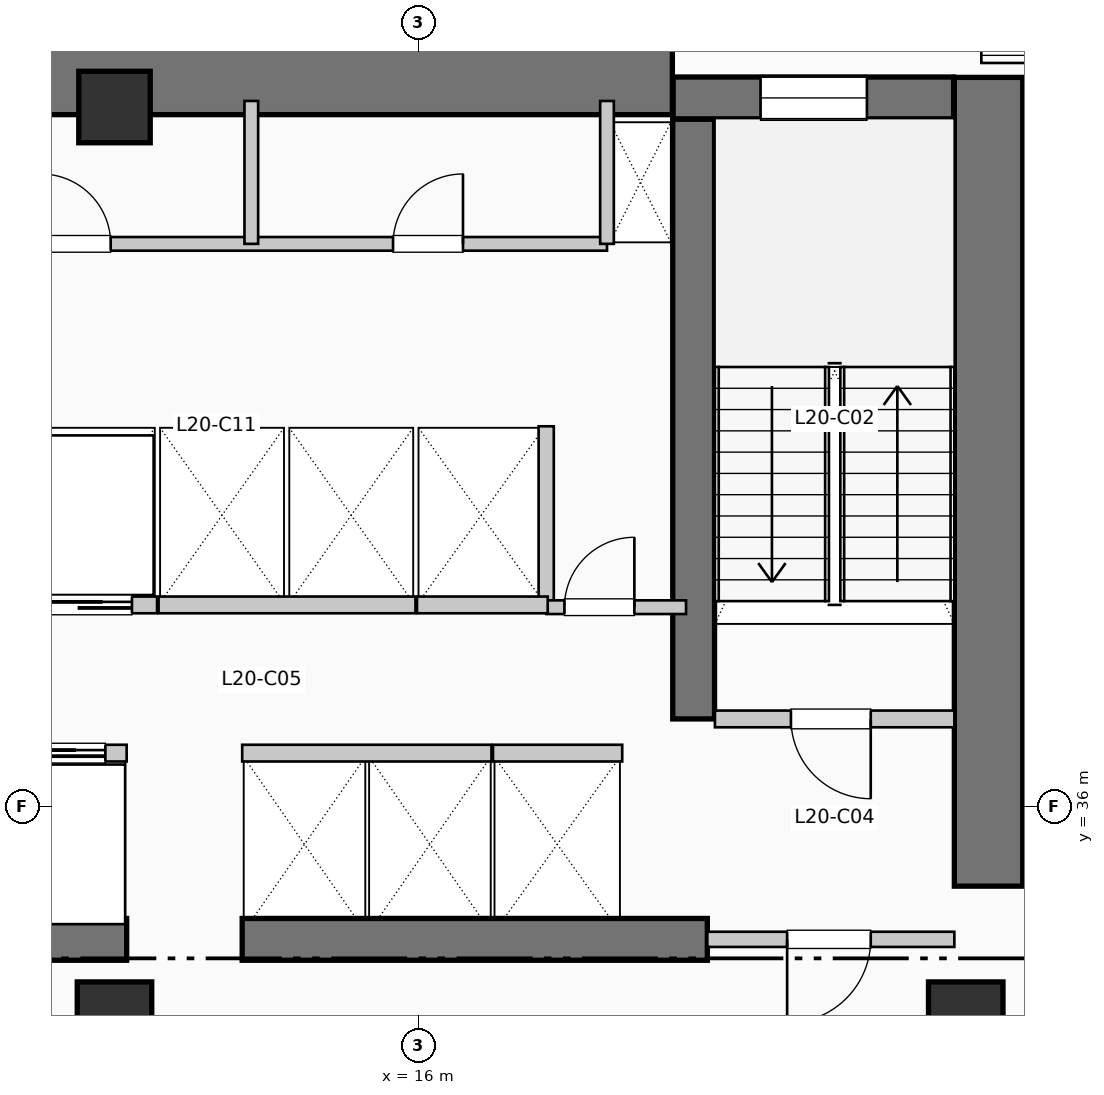
"""IFC4 building model, lengths in metres.
Left out: names, types, materials, properties, quantities, classifications, styles, units other than length and angle.
Written with IfcOpenShell. Run it as: python <this file> out.ifc"""

import sys

from ifc_helpers import new_model, si_unit, direction, frame, frame_2d, origin, origin_2d, place, context, subcontext, project, spatial, rectangle, extrude, element, fill, save


model = new_model("IFC4")
c1 = context("Model", 3, precision=1e-05, world=origin(), true_north=direction((0.0, 1.0)))
c2 = subcontext(c1, "Body", "Model", "MODEL_VIEW")
j1 = project(units=[si_unit("LENGTHUNIT", "METRE"), si_unit("PLANEANGLEUNIT", "RADIAN")], contexts=[c1])
p1 = place(None, origin())
s1 = spatial("IfcSite", under=j1, at=p1, CompositionType="ELEMENT")
p2 = place(p1, origin())
s2 = spatial("IfcBuilding", under=s1, at=p2, CompositionType="ELEMENT")
p3 = place(p2, frame((0.0, 0.0, 85.8)))
s3 = spatial("IfcBuildingStorey", under=s2, at=p3, CompositionType="ELEMENT", Elevation=85.8)
p4 = place(p3, frame((5.36, 45.55, 0.0), z_axis=(0.0, 0.0, 1.0), x_axis=(1.0, 0.0, 0.0)))
e1 = element("IfcWall", 1, at=p4, inside=s3, PredefinedType="SHEAR", context=c2, shape_type="SweptSolid", body=[
    extrude(rectangle(XDim=13.98, YDim=0.9, at=frame_2d((6.99, 0.0))), origin(), (0.0, 0.0, 1.0), 3.96),
])
p5 = place(p3, frame((23.5, 34.95, 0.0), z_axis=(0.0, 0.0, 1.0), x_axis=(0.0, 1.0, 0.0)))
e2 = element("IfcWall", 2, at=p5, inside=s3, PredefinedType="SHEAR", context=c2, shape_type="SweptSolid", body=[
    extrude(rectangle(XDim=10.64, YDim=0.9, at=frame_2d((5.32, 0.0))), origin(), (0.0, 0.0, 1.0), 3.96),
])
p6 = place(p3, frame((1.45, 34.25, 0.0), z_axis=(0.0, 0.0, 1.0), x_axis=(1.0, 0.0, 0.0)))
e3 = element("IfcWall", 3, at=p6, inside=s3, PredefinedType="SHEAR", context=c2, shape_type="SweptSolid", body=[
    extrude(rectangle(XDim=10.71, YDim=0.55, at=frame_2d((5.355, 0.0))), origin(), (0.0, 0.0, 1.0), 3.96),
])
p7 = place(p6, frame((7.25, 0.0, 0.0), z_axis=(0.0, 0.0, 1.0), x_axis=(-1.0, 0.0, 0.0)))
e4 = element("IfcOpeningElement", 4, at=p7, cuts=e3, PredefinedType="OPENING", context=c2, shape_type="SweptSolid", body=[
    extrude(rectangle(XDim=1.1, YDim=2.15, at=frame_2d((0.55, 1.075))), frame((0.0, 0.285, 0.0), z_axis=(0.0, -1.0, 0.0), x_axis=(1.0, 0.0, 0.0)), (0.0, 0.0, 1.0), 0.57),
])
p8 = place(p3, frame((13.68, 34.25, 0.0), z_axis=(0.0, 0.0, 1.0), x_axis=(1.0, 0.0, 0.0)))
e5 = element("IfcWall", 5, at=p8, inside=s3, PredefinedType="SHEAR", context=c2, shape_type="SweptSolid", body=[
    extrude(rectangle(XDim=6.12, YDim=0.55, at=frame_2d((3.06, 0.0))), origin(), (0.0, 0.0, 1.0), 3.96),
])
p9 = place(p3, frame((19.62, 37.15, 0.0), z_axis=(0.0, 0.0, 1.0), x_axis=(0.0, 1.0, 0.0)))
e6 = element("IfcWall", 6, at=p9, inside=s3, PredefinedType="SHEAR", context=c2, shape_type="SweptSolid", body=[
    extrude(rectangle(XDim=7.89, YDim=0.55, at=frame_2d((3.945, 0.0))), origin(), (0.0, 0.0, 1.0), 3.96),
])
p10 = place(p3, frame((19.35, 45.32, 0.0), z_axis=(0.0, 0.0, 1.0), x_axis=(1.0, 0.0, 0.0)))
e7 = element("IfcWall", 7, at=p10, inside=s3, PredefinedType="SHEAR", context=c2, shape_type="SweptSolid", body=[
    extrude(rectangle(XDim=3.69, YDim=0.55, at=frame_2d((1.845, 0.0))), origin(), (0.0, 0.0, 1.0), 3.96),
])
p11 = place(p10, frame((1.15, 0.0, 1.05)))
e8 = element("IfcOpeningElement", 8, at=p11, cuts=e7, PredefinedType="OPENING", context=c2, shape_type="SweptSolid", body=[
    extrude(rectangle(XDim=1.4, YDim=1.8, at=frame_2d((0.7, 0.9))), frame((0.0, 0.285, 0.0), z_axis=(0.0, -1.0, 0.0), x_axis=(1.0, 0.0, 0.0)), (0.0, 0.0, 1.0), 0.57),
])
p12 = place(p3, frame((12.0, 33.2, 0.0), z_axis=(0.0, 0.0, 1.0), x_axis=(1.0, 0.0, 0.0)))
e9 = element("IfcColumn", 9, at=p12, inside=s3, PredefinedType="COLUMN", context=c2, shape_type="SweptSolid", body=[
    extrude(rectangle(XDim=0.98, YDim=0.98, at=origin_2d()), origin(), (0.0, 0.0, 1.0), 3.96),
])
p13 = place(p3, frame((12.0, 45.2, 0.0), z_axis=(0.0, 0.0, 1.0), x_axis=(1.0, 0.0, 0.0)))
e10 = element("IfcColumn", 10, at=p13, inside=s3, PredefinedType="COLUMN", context=c2, shape_type="SweptSolid", body=[
    extrude(rectangle(XDim=0.94, YDim=0.94, at=origin_2d()), origin(), (0.0, 0.0, 1.0), 3.96),
])
p14 = place(p3, frame((23.2, 33.2, 0.0), z_axis=(0.0, 0.0, 1.0), x_axis=(1.0, 0.0, 0.0)))
e11 = element("IfcColumn", 11, at=p14, inside=s3, PredefinedType="COLUMN", context=c2, shape_type="SweptSolid", body=[
    extrude(rectangle(XDim=0.98, YDim=0.98, at=origin_2d()), origin(), (0.0, 0.0, 1.0), 3.96),
])
p15 = place(p3, frame((19.9, 37.15, 0.0), z_axis=(0.0, 0.0, 1.0), x_axis=(1.0, 0.0, 0.0)))
e12 = element("IfcWall", 12, at=p15, inside=s3, PredefinedType="PARTITIONING", context=c2, shape_type="SweptSolid", body=[
    extrude(rectangle(XDim=3.15, YDim=0.22, at=frame_2d((1.575, 0.0))), origin(), (0.0, 0.0, 1.0), 3.71),
])
p16 = place(p15, frame((2.05, 0.0, 0.0), z_axis=(0.0, 0.0, 1.0), x_axis=(-1.0, 0.0, 0.0)))
e13 = element("IfcOpeningElement", 13, at=p16, cuts=e12, PredefinedType="OPENING", context=c2, shape_type="SweptSolid", body=[
    extrude(rectangle(XDim=1.05, YDim=2.15, at=frame_2d((0.525, 1.075))), frame((0.0, 0.12, 0.0), z_axis=(0.0, -1.0, 0.0), x_axis=(1.0, 0.0, 0.0)), (0.0, 0.0, 1.0), 0.24),
])
p17 = place(p3, frame((19.8, 34.25, 0.0), z_axis=(0.0, 0.0, 1.0), x_axis=(1.0, 0.0, 0.0)))
e14 = element("IfcWall", 14, at=p17, inside=s3, PredefinedType="PARTITIONING", context=c2, shape_type="SweptSolid", body=[
    extrude(rectangle(XDim=3.25, YDim=0.2, at=frame_2d((1.625, 0.0))), origin(), (0.0, 0.0, 1.0), 3.71),
])
p18 = place(p17, frame((2.15, 0.0, 0.0), z_axis=(0.0, 0.0, 1.0), x_axis=(-1.0, 0.0, 0.0)))
e15 = element("IfcOpeningElement", 15, at=p18, cuts=e14, PredefinedType="OPENING", context=c2, shape_type="SweptSolid", body=[
    extrude(rectangle(XDim=1.1, YDim=2.15, at=frame_2d((0.55, 1.075))), frame((0.0, 0.11, 0.0), z_axis=(0.0, -1.0, 0.0), x_axis=(1.0, 0.0, 0.0)), (0.0, 0.0, 1.0), 0.22),
])
p19 = place(p3, frame((17.68, 38.65, 0.0), z_axis=(0.0, 0.0, 1.0), x_axis=(0.0, 1.0, 0.0)))
e16 = element("IfcWall", 16, at=p19, inside=s3, PredefinedType="PARTITIONING", context=c2, shape_type="SweptSolid", body=[
    extrude(rectangle(XDim=2.35, YDim=0.2, at=frame_2d((1.175, 0.0))), origin(), (0.0, 0.0, 1.0), 3.71),
])
p20 = place(p3, frame((17.68, 38.62, 0.0), z_axis=(0.0, 0.0, 1.0), x_axis=(1.0, 0.0, 0.0)))
e17 = element("IfcWall", 17, at=p20, inside=s3, PredefinedType="PARTITIONING", context=c2, shape_type="SweptSolid", body=[
    extrude(rectangle(XDim=1.84, YDim=0.18, at=frame_2d((0.92, 0.0))), origin(), (0.0, 0.0, 1.0), 3.71),
])
p21 = place(p20, frame((0.24, 0.0, 0.0)))
e18 = element("IfcOpeningElement", 18, at=p21, cuts=e17, PredefinedType="OPENING", context=c2, shape_type="SweptSolid", body=[
    extrude(rectangle(XDim=0.92, YDim=2.1, at=frame_2d((0.46, 1.05))), frame((0.0, 0.1, 0.0), z_axis=(0.0, -1.0, 0.0), x_axis=(1.0, 0.0, 0.0)), (0.0, 0.0, 1.0), 0.2),
])
p22 = place(p3, frame((8.9, 36.7, 0.0), z_axis=(0.0, 0.0, 1.0), x_axis=(1.0, 0.0, 0.0)))
e19 = element("IfcWall", 19, at=p22, inside=s3, PredefinedType="PARTITIONING", context=c2, shape_type="SweptSolid", body=[
    extrude(rectangle(XDim=3.26, YDim=0.22, at=frame_2d((1.63, 0.0))), origin(), (0.0, 0.0, 1.0), 3.71),
])
p23 = place(p22, frame((0.26, 0.0, 0.0)))
e20 = element("IfcOpeningElement", 20, at=p23, cuts=e19, PredefinedType="OPENING", context=c2, shape_type="SweptSolid", body=[
    extrude(rectangle(XDim=1.1, YDim=2.2, at=frame_2d((0.55, 1.1))), frame((0.0, 0.12, 0.0), z_axis=(0.0, -1.0, 0.0), x_axis=(1.0, 0.0, 0.0)), (0.0, 0.0, 1.0), 0.24),
])
p24 = place(p22, frame((1.88, 0.0, 0.0)))
e21 = element("IfcOpeningElement", 21, at=p24, cuts=e19, PredefinedType="OPENING", context=c2, shape_type="SweptSolid", body=[
    extrude(rectangle(XDim=1.1, YDim=2.2, at=frame_2d((0.55, 1.1))), frame((0.0, 0.12, 0.0), z_axis=(0.0, -1.0, 0.0), x_axis=(1.0, 0.0, 0.0)), (0.0, 0.0, 1.0), 0.24),
])
p25 = place(p3, frame((9.18, 38.65, 0.0), z_axis=(0.0, 0.0, 1.0), x_axis=(1.0, 0.0, 0.0)))
e22 = element("IfcWall", 22, at=p25, inside=s3, PredefinedType="PARTITIONING", context=c2, shape_type="SweptSolid", body=[
    extrude(rectangle(XDim=3.38, YDim=0.22, at=frame_2d((1.69, 0.0))), origin(), (0.0, 0.0, 1.0), 3.71),
])
p26 = place(p25, frame((0.3, 0.0, 0.0)))
e23 = element("IfcOpeningElement", 23, at=p26, cuts=e22, PredefinedType="OPENING", context=c2, shape_type="SweptSolid", body=[
    extrude(rectangle(XDim=1.1, YDim=2.2, at=frame_2d((0.55, 1.1))), frame((0.0, 0.12, 0.0), z_axis=(0.0, -1.0, 0.0), x_axis=(1.0, 0.0, 0.0)), (0.0, 0.0, 1.0), 0.24),
])
p27 = place(p25, frame((1.95, 0.0, 0.0)))
e24 = element("IfcOpeningElement", 24, at=p27, cuts=e22, PredefinedType="OPENING", context=c2, shape_type="SweptSolid", body=[
    extrude(rectangle(XDim=1.1, YDim=2.2, at=frame_2d((0.55, 1.1))), frame((0.0, 0.12, 0.0), z_axis=(0.0, -1.0, 0.0), x_axis=(1.0, 0.0, 0.0)), (0.0, 0.0, 1.0), 0.24),
])
p28 = place(p3, frame((13.68, 36.7, 0.0), z_axis=(0.0, 0.0, 1.0), x_axis=(1.0, 0.0, 0.0)))
e25 = element("IfcWall", 25, at=p28, inside=s3, PredefinedType="PARTITIONING", context=c2, shape_type="SweptSolid", body=[
    extrude(rectangle(XDim=3.28, YDim=0.22, at=frame_2d((1.64, 0.0))), origin(), (0.0, 0.0, 1.0), 3.71),
])
p29 = place(p3, frame((12.58, 38.65, 0.0), z_axis=(0.0, 0.0, 1.0), x_axis=(1.0, 0.0, 0.0)))
e26 = element("IfcWall", 26, at=p29, inside=s3, PredefinedType="PARTITIONING", context=c2, shape_type="SweptSolid", body=[
    extrude(rectangle(XDim=3.38, YDim=0.22, at=frame_2d((1.69, 0.0))), origin(), (0.0, 0.0, 1.0), 3.71),
])
p30 = place(p3, frame((16.98, 36.7, 0.0), z_axis=(0.0, 0.0, 1.0), x_axis=(1.0, 0.0, 0.0)))
e27 = element("IfcWall", 27, at=p30, inside=s3, PredefinedType="PARTITIONING", context=c2, shape_type="SweptSolid", body=[
    extrude(rectangle(XDim=1.7, YDim=0.22, at=frame_2d((0.85, 0.0))), origin(), (0.0, 0.0, 1.0), 3.71),
])
p31 = place(p3, frame((15.98, 38.65, 0.0), z_axis=(0.0, 0.0, 1.0), x_axis=(1.0, 0.0, 0.0)))
e28 = element("IfcWall", 28, at=p31, inside=s3, PredefinedType="PARTITIONING", context=c2, shape_type="SweptSolid", body=[
    extrude(rectangle(XDim=1.72, YDim=0.22, at=frame_2d((0.86, 0.0))), origin(), (0.0, 0.0, 1.0), 3.71),
])
p32 = place(p3, frame((9.15, 43.4, 0.0), z_axis=(0.0, 0.0, 1.0), x_axis=(1.0, 0.0, 0.0)))
e29 = element("IfcWall", 29, at=p32, inside=s3, PredefinedType="PLUMBINGWALL", context=c2, shape_type="SweptSolid", body=[
    extrude(rectangle(XDim=9.33, YDim=0.18, at=frame_2d((4.665, 0.0))), origin(), (0.0, 0.0, 1.0), 3.71),
])
p33 = place(p32, frame((1.88, 0.0, 0.0)))
e30 = element("IfcOpeningElement", 30, at=p33, cuts=e29, PredefinedType="OPENING", context=c2, shape_type="SweptSolid", body=[
    extrude(rectangle(XDim=0.92, YDim=2.1, at=frame_2d((0.46, 1.05))), frame((0.0, 0.1, 0.0), z_axis=(0.0, -1.0, 0.0), x_axis=(1.0, 0.0, 0.0)), (0.0, 0.0, 1.0), 0.2),
])
p34 = place(p32, frame((6.515, 0.0, 0.0)))
e31 = element("IfcOpeningElement", 31, at=p34, cuts=e29, PredefinedType="OPENING", context=c2, shape_type="SweptSolid", body=[
    extrude(rectangle(XDim=0.92, YDim=2.1, at=frame_2d((0.46, 1.05))), frame((0.0, 0.1, 0.0), z_axis=(0.0, -1.0, 0.0), x_axis=(1.0, 0.0, 0.0)), (0.0, 0.0, 1.0), 0.2),
])
for number, where, z_axis, x_axis in (
    (32, (18.48, 43.4, 0.0), (0.0, 0.0, 1.0), (0.0, 1.0, 0.0)),
    (33, (13.8, 43.4, 0.0), (0.0, 0.0, 1.0), (0.0, 1.0, 0.0)),
):
    element("IfcWall", number, at=place(p3, frame(where, z_axis=z_axis, x_axis=x_axis)), inside=s3, PredefinedType="PLUMBINGWALL", context=c2, shape_type="SweptSolid", body=[
        extrude(rectangle(XDim=1.88, YDim=0.18, at=frame_2d((0.94, 0.0))), origin(), (0.0, 0.0, 1.0), 3.71),
    ])
p35 = place(p11, origin())
e34 = element("IfcWindow", 34, at=p35, inside=s3, PartitioningType="SINGLE_PANEL", PredefinedType="WINDOW", context=c2, shape_type="SweptSolid", body=[
    extrude(rectangle(XDim=1.4, YDim=1.8, at=frame_2d((0.7, 0.9))), frame((0.0, 0.03, 0.0), z_axis=(0.0, -1.0, 0.0), x_axis=(1.0, 0.0, 0.0)), (0.0, 0.0, 1.0), 0.06),
])
fill(e8, e34)
p36 = place(p16, origin())
e35 = element("IfcDoor", 35, at=p36, inside=s3, OperationType="SINGLE_SWING_RIGHT", PredefinedType="DOOR", context=c2, shape_type="SweptSolid", body=[
    extrude(rectangle(XDim=1.05, YDim=2.15, at=frame_2d((0.525, 1.075))), frame((0.0, 0.025, 0.0), z_axis=(0.0, -1.0, 0.0), x_axis=(1.0, 0.0, 0.0)), (0.0, 0.0, 1.0), 0.05),
])
fill(e13, e35)
p37 = place(p18, origin())
e36 = element("IfcDoor", 36, at=p37, inside=s3, OperationType="SINGLE_SWING_LEFT", PredefinedType="DOOR", context=c2, shape_type="SweptSolid", body=[
    extrude(rectangle(XDim=1.1, YDim=2.15, at=frame_2d((0.55, 1.075))), frame((0.0, 0.025, 0.0), z_axis=(0.0, -1.0, 0.0), x_axis=(1.0, 0.0, 0.0)), (0.0, 0.0, 1.0), 0.05),
])
fill(e15, e36)
p38 = place(p21, origin())
e37 = element("IfcDoor", 37, at=p38, inside=s3, OperationType="SINGLE_SWING_RIGHT", PredefinedType="DOOR", context=c2, shape_type="SweptSolid", body=[
    extrude(rectangle(XDim=0.92, YDim=2.1, at=frame_2d((0.46, 1.05))), frame((0.0, 0.025, 0.0), z_axis=(0.0, -1.0, 0.0), x_axis=(1.0, 0.0, 0.0)), (0.0, 0.0, 1.0), 0.05),
])
fill(e18, e37)
p39 = place(p24, origin())
e38 = element("IfcDoor", 38, at=p39, inside=s3, OperationType="SLIDING_TO_LEFT", PredefinedType="DOOR", context=c2, shape_type="SweptSolid", body=[
    extrude(rectangle(XDim=1.1, YDim=2.2, at=frame_2d((0.55, 1.1))), frame((0.0, 0.025, 0.0), z_axis=(0.0, -1.0, 0.0), x_axis=(1.0, 0.0, 0.0)), (0.0, 0.0, 1.0), 0.05),
])
fill(e21, e38)
p40 = place(p27, origin())
e39 = element("IfcDoor", 39, at=p40, inside=s3, OperationType="SLIDING_TO_LEFT", PredefinedType="DOOR", context=c2, shape_type="SweptSolid", body=[
    extrude(rectangle(XDim=1.1, YDim=2.2, at=frame_2d((0.55, 1.1))), frame((0.0, 0.025, 0.0), z_axis=(0.0, -1.0, 0.0), x_axis=(1.0, 0.0, 0.0)), (0.0, 0.0, 1.0), 0.05),
])
fill(e24, e39)
p41 = place(p33, origin())
e40 = element("IfcDoor", 40, at=p41, inside=s3, OperationType="SINGLE_SWING_LEFT", PredefinedType="DOOR", context=c2, shape_type="SweptSolid", body=[
    extrude(rectangle(XDim=0.92, YDim=2.1, at=frame_2d((0.46, 1.05))), frame((0.0, 0.025, 0.0), z_axis=(0.0, -1.0, 0.0), x_axis=(1.0, 0.0, 0.0)), (0.0, 0.0, 1.0), 0.05),
])
fill(e30, e40)
p42 = place(p34, origin())
e41 = element("IfcDoor", 41, at=p42, inside=s3, OperationType="SINGLE_SWING_RIGHT", PredefinedType="DOOR", context=c2, shape_type="SweptSolid", body=[
    extrude(rectangle(XDim=0.92, YDim=2.1, at=frame_2d((0.46, 1.05))), frame((0.0, 0.025, 0.0), z_axis=(0.0, -1.0, 0.0), x_axis=(1.0, 0.0, 0.0)), (0.0, 0.0, 1.0), 0.05),
])
fill(e31, e41)
save(model, sys.argv[1])
